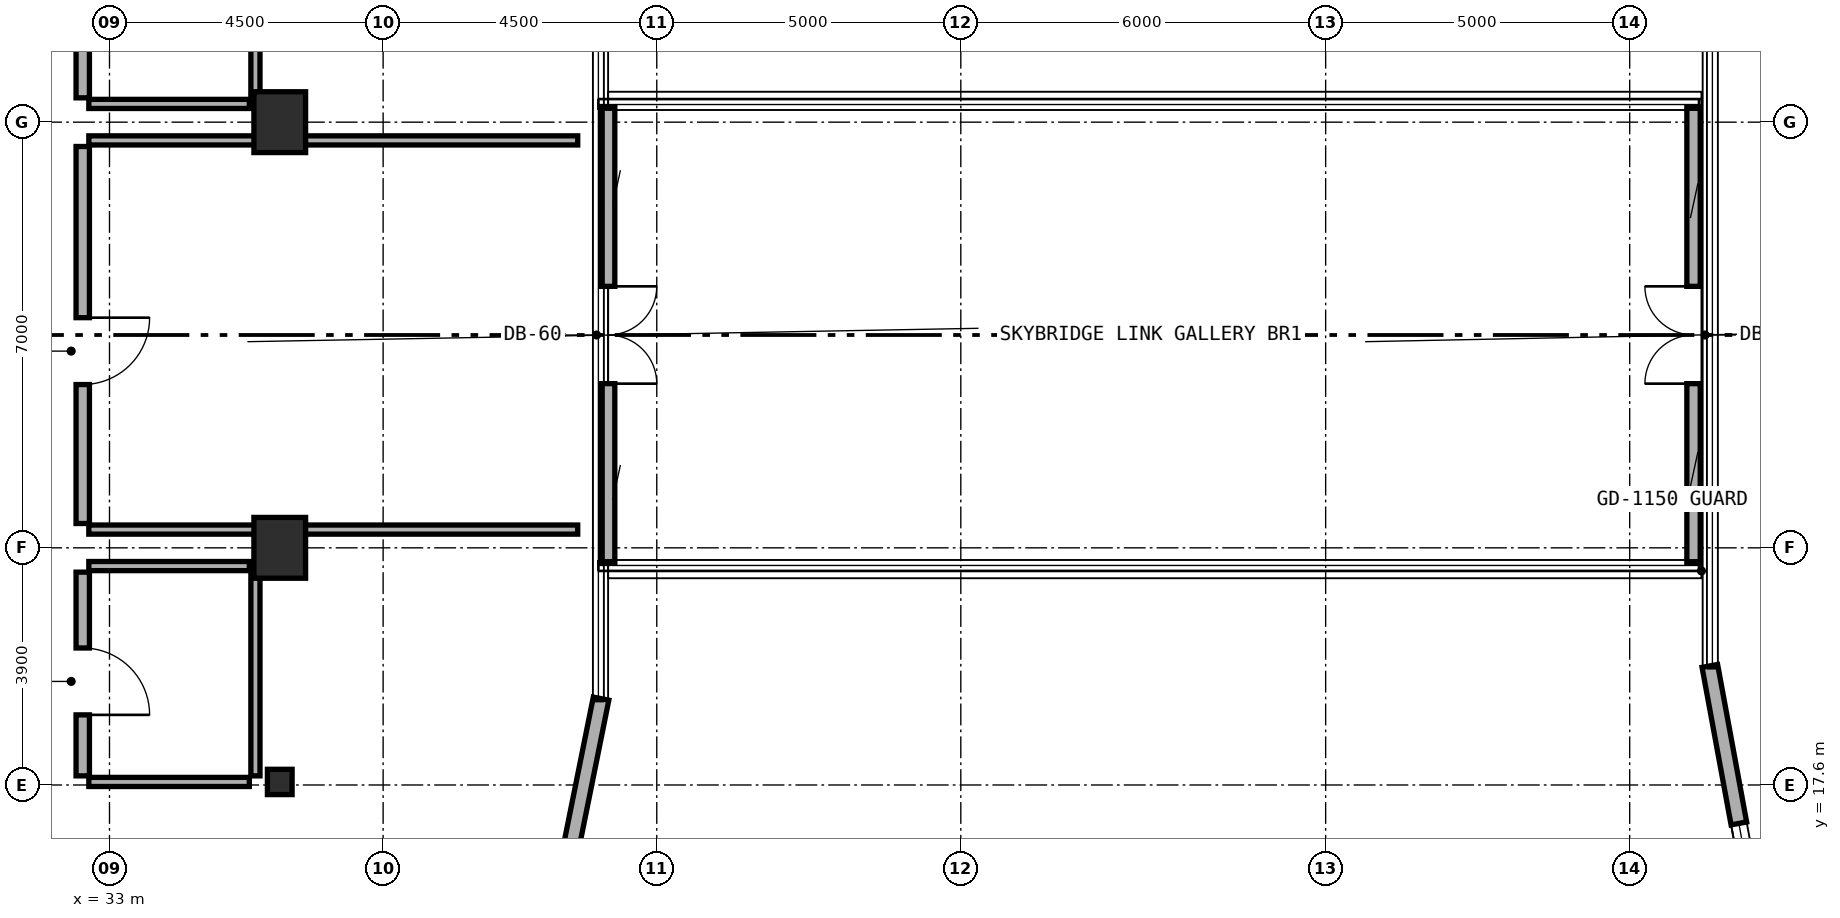
"""IFC4 building model, lengths in metres.
Left out: names, types, materials, properties, quantities, classifications, styles, units other than length and angle.
Written with IfcOpenShell. Run it as: python <this file> out.ifc"""

import sys

from ifc_helpers import new_model, si_unit, direction, frame, frame_2d, origin, origin_2d, place, context, subcontext, project, spatial, rectangle, i_section, extrude, element, fill, save


model = new_model("IFC4")
c1 = context("Model", 3, precision=1e-05, world=origin(), true_north=direction((0.0, 1.0)))
c2 = subcontext(c1, "Body", "Model", "MODEL_VIEW")
j1 = project(units=[si_unit("LENGTHUNIT", "METRE"), si_unit("PLANEANGLEUNIT", "RADIAN")], contexts=[c1])
p1 = place(None, origin())
s1 = spatial("IfcSite", under=j1, at=p1, CompositionType="ELEMENT")
p2 = place(p1, origin())
s2 = spatial("IfcBuilding", under=s1, at=p2, CompositionType="ELEMENT")
p3 = place(p2, frame((0.0, 0.0, 119.5)))
s3 = spatial("IfcBuildingStorey", under=s2, at=p3, CompositionType="ELEMENT", Elevation=119.5)
for number, where, z_axis, x_axis in (
    (1, (35.8, 21.5, 0.0), (0.0, 0.0, 1.0), (1.0, 0.0, 0.0)),
    (2, (35.8, 28.5, 0.0), (0.0, 0.0, 1.0), (1.0, 0.0, 0.0)),
):
    element("IfcColumn", number, at=place(p3, frame(where, z_axis=z_axis, x_axis=x_axis)), inside=s3, PredefinedType="COLUMN", context=c2, shape_type="SweptSolid", body=[
        extrude(rectangle(XDim=0.85, YDim=1.0, at=origin_2d()), origin(), (0.0, 0.0, 1.0), 4.5),
    ])
p4 = place(p3, frame((35.8, 17.65, 0.0), z_axis=(0.0, 0.0, 1.0), x_axis=(1.0, 0.0, 0.0)))
e3 = element("IfcColumn", 3, at=p4, inside=s3, PredefinedType="COLUMN", context=c2, shape_type="SweptSolid", body=[
    extrude(i_section(OverallWidth=0.406, OverallDepth=0.416, WebThickness=0.024, FlangeThickness=0.039, FilletRadius=0.015, at=origin_2d()), origin(), (0.0, 0.0, 1.0), 4.5),
])
p5 = place(p3, frame((39.271, 10.018, 0.0), z_axis=(0.0, 0.0, 1.0), x_axis=(0.197435082048, 0.980315963543, 0.0)))
e4 = element("IfcWall", 4, at=p5, inside=s3, PredefinedType="STANDARD", context=c2, shape_type="SweptSolid", body=[
    extrude(rectangle(XDim=9.183, YDim=0.26, at=frame_2d((4.591, 0.0))), origin(), (0.0, 0.0, 1.0), 4.22),
])
p6 = place(p5, frame((4.031, 0.0, 0.8)))
e5 = element("IfcOpeningElement", 5, at=p6, cuts=e4, PredefinedType="OPENING", context=c2, shape_type="SweptSolid", body=[
    extrude(rectangle(XDim=2.4, YDim=1.6, at=frame_2d((1.2, 0.8))), frame((0.0, 0.14, 0.0), z_axis=(0.0, -1.0, 0.0), x_axis=(1.0, 0.0, 0.0)), (0.0, 0.0, 1.0), 0.28),
])
p7 = place(p3, frame((59.318, 19.558, 0.0), z_axis=(0.0, 0.0, 1.0), x_axis=(0.181209963057, -0.983444431215, 0.0)))
e6 = element("IfcWall", 6, at=p7, inside=s3, PredefinedType="STANDARD", context=c2, shape_type="SweptSolid", body=[
    extrude(rectangle(XDim=8.889, YDim=0.26, at=frame_2d((4.445, 0.0))), origin(), (0.0, 0.0, 1.0), 4.25),
])
p8 = place(p7, frame((2.634, 0.0, 0.8)))
e7 = element("IfcOpeningElement", 7, at=p8, cuts=e6, PredefinedType="OPENING", context=c2, shape_type="SweptSolid", body=[
    extrude(rectangle(XDim=2.4, YDim=1.6, at=frame_2d((1.2, 0.8))), frame((0.0, 0.14, 0.0), z_axis=(0.0, -1.0, 0.0), x_axis=(1.0, 0.0, 0.0)), (0.0, 0.0, 1.0), 0.28),
])
for number, where, z_axis, x_axis in (
    (8, (32.66, 21.8, 0.0), (0.0, 0.0, 1.0), (1.0, 0.0, 0.0)),
    (9, (32.66, 28.2, 0.0), (0.0, 0.0, 1.0), (1.0, 0.0, 0.0)),
):
    element("IfcWall", number, at=place(p3, frame(where, z_axis=z_axis, x_axis=x_axis)), inside=s3, PredefinedType="PARTITIONING", context=c2, shape_type="SweptSolid", body=[
        extrude(rectangle(XDim=8.04, YDim=0.15, at=frame_2d((4.02, 0.0))), origin(), (0.0, 0.0, 1.0), 3.835),
    ])
p9 = place(p3, frame((32.56, 21.9, 0.0), z_axis=(0.0, 0.0, 1.0), x_axis=(0.0, 1.0, 0.0)))
e10 = element("IfcWall", 10, at=p9, inside=s3, PredefinedType="SOLIDWALL", context=c2, shape_type="SweptSolid", body=[
    extrude(rectangle(XDim=6.2, YDim=0.22, at=frame_2d((3.1, 0.0))), origin(), (0.0, 0.0, 1.0), 4.22),
])
p10 = place(p9, frame((2.285, 0.0, 0.0)))
e11 = element("IfcOpeningElement", 11, at=p10, cuts=e10, PredefinedType="OPENING", context=c2, shape_type="SweptSolid", body=[
    extrude(rectangle(XDim=1.1, YDim=2.1, at=frame_2d((0.55, 1.05))), frame((0.0, 0.12, 0.0), z_axis=(0.0, -1.0, 0.0), x_axis=(1.0, 0.0, 0.0)), (0.0, 0.0, 1.0), 0.24),
])
p11 = place(p3, frame((35.4, 17.75, 0.0), z_axis=(0.0, 0.0, 1.0), x_axis=(0.0, 1.0, 0.0)))
e12 = element("IfcWall", 12, at=p11, inside=s3, PredefinedType="PARTITIONING", context=c2, shape_type="SweptSolid", body=[
    extrude(rectangle(XDim=3.35, YDim=0.15, at=frame_2d((1.675, 0.0))), origin(), (0.0, 0.0, 1.0), 4.22),
])
p12 = place(p3, frame((32.66, 17.65, 0.0), z_axis=(0.0, 0.0, 1.0), x_axis=(1.0, 0.0, 0.0)))
e13 = element("IfcWall", 13, at=p12, inside=s3, PredefinedType="PARTITIONING", context=c2, shape_type="SweptSolid", body=[
    extrude(rectangle(XDim=2.64, YDim=0.15, at=frame_2d((1.32, 0.0))), origin(), (0.0, 0.0, 1.0), 3.695),
])
p13 = place(p3, frame((32.66, 21.2, 0.0), z_axis=(0.0, 0.0, 1.0), x_axis=(1.0, 0.0, 0.0)))
e14 = element("IfcWall", 14, at=p13, inside=s3, PredefinedType="PARTITIONING", context=c2, shape_type="SweptSolid", body=[
    extrude(rectangle(XDim=2.64, YDim=0.15, at=frame_2d((1.32, 0.0))), origin(), (0.0, 0.0, 1.0), 4.22),
])
p14 = place(p3, frame((32.56, 17.75, 0.0), z_axis=(0.0, 0.0, 1.0), x_axis=(0.0, 1.0, 0.0)))
e15 = element("IfcWall", 15, at=p14, inside=s3, PredefinedType="SOLIDWALL", context=c2, shape_type="SweptSolid", body=[
    extrude(rectangle(XDim=3.35, YDim=0.22, at=frame_2d((1.675, 0.0))), origin(), (0.0, 0.0, 1.0), 4.22),
])
p15 = place(p14, frame((1.003, 0.0, 0.0)))
e16 = element("IfcOpeningElement", 16, at=p15, cuts=e15, PredefinedType="OPENING", context=c2, shape_type="SweptSolid", body=[
    extrude(rectangle(XDim=1.1, YDim=2.1, at=frame_2d((0.55, 1.05))), frame((0.0, 0.12, 0.0), z_axis=(0.0, -1.0, 0.0), x_axis=(1.0, 0.0, 0.0)), (0.0, 0.0, 1.0), 0.24),
])
p16 = place(p3, frame((35.4, 28.9, 0.0), z_axis=(0.0, 0.0, 1.0), x_axis=(0.0, 1.0, 0.0)))
e17 = element("IfcWall", 17, at=p16, inside=s3, PredefinedType="PARTITIONING", context=c2, shape_type="SweptSolid", body=[
    extrude(rectangle(XDim=3.35, YDim=0.15, at=frame_2d((1.675, 0.0))), origin(), (0.0, 0.0, 1.0), 4.22),
])
p17 = place(p3, frame((32.66, 28.8, 0.0), z_axis=(0.0, 0.0, 1.0), x_axis=(1.0, 0.0, 0.0)))
e18 = element("IfcWall", 18, at=p17, inside=s3, PredefinedType="PARTITIONING", context=c2, shape_type="SweptSolid", body=[
    extrude(rectangle(XDim=2.64, YDim=0.15, at=frame_2d((1.32, 0.0))), origin(), (0.0, 0.0, 1.0), 4.22),
])
p18 = place(p3, frame((32.56, 28.9, 0.0), z_axis=(0.0, 0.0, 1.0), x_axis=(0.0, 1.0, 0.0)))
e19 = element("IfcWall", 19, at=p18, inside=s3, PredefinedType="SOLIDWALL", context=c2, shape_type="SweptSolid", body=[
    extrude(rectangle(XDim=3.35, YDim=0.22, at=frame_2d((1.675, 0.0))), origin(), (0.0, 0.0, 1.0), 4.22),
])
p19 = place(p18, frame((1.003, 0.0, 0.0)))
e20 = element("IfcOpeningElement", 20, at=p19, cuts=e19, PredefinedType="OPENING", context=c2, shape_type="SweptSolid", body=[
    extrude(rectangle(XDim=1.1, YDim=2.1, at=frame_2d((0.55, 1.05))), frame((0.0, 0.12, 0.0), z_axis=(0.0, -1.0, 0.0), x_axis=(1.0, 0.0, 0.0)), (0.0, 0.0, 1.0), 0.24),
])
p20 = place(p3, frame((41.2, 21.25, 0.0), z_axis=(0.0, 0.0, 1.0), x_axis=(0.0, 1.0, 0.0)))
e21 = element("IfcWall", 21, at=p20, inside=s3, PredefinedType="SOLIDWALL", context=c2, shape_type="SweptSolid", body=[
    extrude(rectangle(XDim=7.5, YDim=0.22, at=frame_2d((3.75, 0.0))), origin(), (0.0, 0.0, 1.0), 3.795),
])
p21 = place(p20, frame((2.95, 0.0, 0.0)))
e22 = element("IfcOpeningElement", 22, at=p21, cuts=e21, PredefinedType="OPENING", context=c2, shape_type="SweptSolid", body=[
    extrude(rectangle(XDim=1.6, YDim=2.15, at=frame_2d((0.8, 1.075))), frame((0.0, 0.12, 0.0), z_axis=(0.0, -1.0, 0.0), x_axis=(1.0, 0.0, 0.0)), (0.0, 0.0, 1.0), 0.24),
])
p22 = place(p3, frame((59.05, 21.25, 0.0), z_axis=(0.0, 0.0, 1.0), x_axis=(0.0, 1.0, 0.0)))
e23 = element("IfcWall", 23, at=p22, inside=s3, PredefinedType="SOLIDWALL", context=c2, shape_type="SweptSolid", body=[
    extrude(rectangle(XDim=7.5, YDim=0.22, at=frame_2d((3.75, 0.0))), origin(), (0.0, 0.0, 1.0), 3.795),
])
p23 = place(p22, frame((2.95, 0.0, 0.0)))
e24 = element("IfcOpeningElement", 24, at=p23, cuts=e23, PredefinedType="OPENING", context=c2, shape_type="SweptSolid", body=[
    extrude(rectangle(XDim=1.6, YDim=2.15, at=frame_2d((0.8, 1.075))), frame((0.0, 0.12, 0.0), z_axis=(0.0, -1.0, 0.0), x_axis=(1.0, 0.0, 0.0)), (0.0, 0.0, 1.0), 0.24),
])
p24 = place(p8, origin())
e25 = element("IfcWindow", 25, at=p24, inside=s3, PartitioningType="SINGLE_PANEL", PredefinedType="WINDOW", context=c2, shape_type="SweptSolid", body=[
    extrude(rectangle(XDim=2.4, YDim=1.6, at=frame_2d((1.2, 0.8))), frame((0.0, 0.03, 0.0), z_axis=(0.0, -1.0, 0.0), x_axis=(1.0, 0.0, 0.0)), (0.0, 0.0, 1.0), 0.06),
])
fill(e7, e25)
p25 = place(p10, frame((1.1, 0.0, 0.0), z_axis=(0.0, 0.0, 1.0), x_axis=(-1.0, 0.0, 0.0)))
e26 = element("IfcDoor", 26, at=p25, inside=s3, OperationType="SINGLE_SWING_LEFT", PredefinedType="DOOR", context=c2, shape_type="SweptSolid", body=[
    extrude(rectangle(XDim=1.1, YDim=2.1, at=frame_2d((0.55, 1.05))), frame((0.0, 0.025, 0.0), z_axis=(0.0, -1.0, 0.0), x_axis=(1.0, 0.0, 0.0)), (0.0, 0.0, 1.0), 0.05),
])
fill(e11, e26)
p26 = place(p15, frame((1.1, 0.0, 0.0), z_axis=(0.0, 0.0, 1.0), x_axis=(-1.0, 0.0, 0.0)))
e27 = element("IfcDoor", 27, at=p26, inside=s3, OperationType="SINGLE_SWING_RIGHT", PredefinedType="DOOR", context=c2, shape_type="SweptSolid", body=[
    extrude(rectangle(XDim=1.1, YDim=2.1, at=frame_2d((0.55, 1.05))), frame((0.0, 0.025, 0.0), z_axis=(0.0, -1.0, 0.0), x_axis=(1.0, 0.0, 0.0)), (0.0, 0.0, 1.0), 0.05),
])
fill(e16, e27)
p27 = place(p21, frame((1.6, 0.0, 0.0), z_axis=(0.0, 0.0, 1.0), x_axis=(-1.0, 0.0, 0.0)))
e28 = element("IfcDoor", 28, at=p27, inside=s3, OperationType="DOUBLE_DOOR_SINGLE_SWING", PredefinedType="DOOR", context=c2, shape_type="SweptSolid", body=[
    extrude(rectangle(XDim=1.6, YDim=2.15, at=frame_2d((0.8, 1.075))), frame((0.0, 0.025, 0.0), z_axis=(0.0, -1.0, 0.0), x_axis=(1.0, 0.0, 0.0)), (0.0, 0.0, 1.0), 0.05),
])
fill(e22, e28)
p28 = place(p23, origin())
e29 = element("IfcDoor", 29, at=p28, inside=s3, OperationType="DOUBLE_DOOR_SINGLE_SWING", PredefinedType="DOOR", context=c2, shape_type="SweptSolid", body=[
    extrude(rectangle(XDim=1.6, YDim=2.15, at=frame_2d((0.8, 1.075))), frame((0.0, 0.025, 0.0), z_axis=(0.0, -1.0, 0.0), x_axis=(1.0, 0.0, 0.0)), (0.0, 0.0, 1.0), 0.05),
])
fill(e24, e29)
save(model, sys.argv[1])
